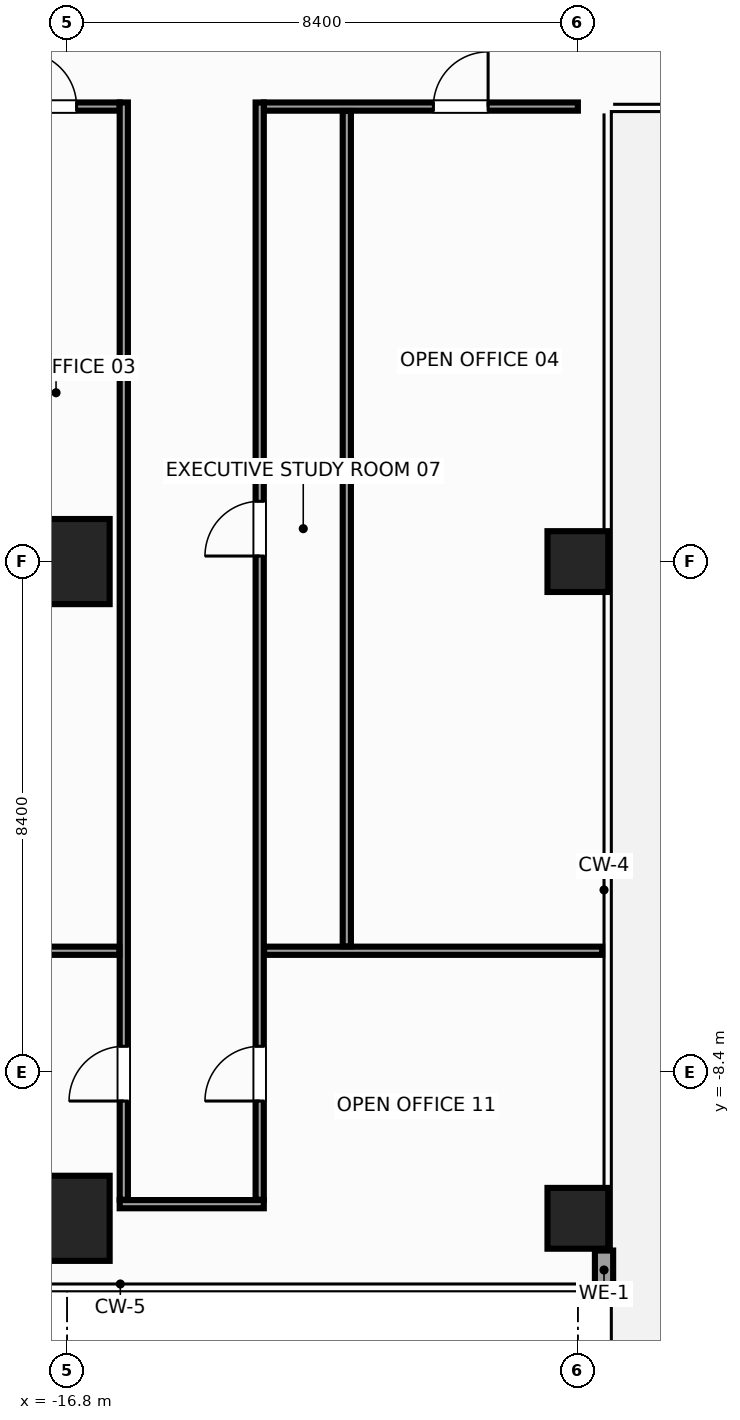
"""IFC4 building model, lengths in metres.
Left out: names, types, materials, properties, quantities, classifications, styles, units other than length and angle.
Written with IfcOpenShell. Run it as: python <this file> out.ifc"""

import sys

from ifc_helpers import new_model, si_unit, direction, frame, frame_2d, origin, origin_2d, place, context, subcontext, project, spatial, rectangle, hollow_rectangle, extrude, source, transform, mapped, element, fill, save


model = new_model("IFC4")
c1 = context("Model", 3, precision=1e-05, world=origin(), true_north=direction((0.0, 1.0)))
c2 = subcontext(c1, "Body", "Model", "MODEL_VIEW")
j1 = project(units=[si_unit("LENGTHUNIT", "METRE"), si_unit("PLANEANGLEUNIT", "RADIAN")], contexts=[c1])
p1 = place(None, origin())
s1 = spatial("IfcSite", under=j1, at=p1, CompositionType="ELEMENT")
p2 = place(p1, origin())
s2 = spatial("IfcBuilding", under=s1, at=p2, CompositionType="ELEMENT")
p3 = place(p2, frame((0.0, 0.0, 196.4)))
s3 = spatial("IfcBuildingStorey", under=s2, at=p3, CompositionType="ELEMENT", Elevation=196.4)
m1 = source(origin(), c2, "Body", "SweptSolid", [
    extrude(rectangle(XDim=1.4, YDim=1.4, at=origin_2d()), origin(), (0.0, 0.0, 1.0), 3.6),
])
for number, where, z_axis, x_axis in (
    (1, (-16.8, -10.8, 0.0), (0.0, 0.0, 1.0), (1.0, 0.0, 0.0)),
    (2, (-16.8, 0.0, 0.0), (0.0, 0.0, 1.0), (1.0, 0.0, 0.0)),
):
    element("IfcColumn", number, at=place(p3, frame(where, z_axis=z_axis, x_axis=x_axis)), inside=s3, PredefinedType="COLUMN", context=c2, shape_type="MappedRepresentation", body=[
        mapped(m1, transform((0.0, 0.0, 0.0), x_axis=(1.0, 0.0, 0.0), y_axis=(0.0, 1.0, 0.0), z_axis=(0.0, 0.0, 1.0), scale=1.0)),
    ])
m2 = source(origin(), c2, "Body", "SweptSolid", [
    extrude(hollow_rectangle(XDim=1.0, YDim=1.0, WallThickness=0.045, at=origin_2d()), origin(), (0.0, 0.0, 1.0), 3.6),
])
for number, where, z_axis, x_axis in (
    (3, (-8.4, 0.0, 0.0), (0.0, 0.0, 1.0), (1.0, 0.0, 0.0)),
    (4, (-8.4, -10.8, 0.0), (0.0, 0.0, 1.0), (1.0, 0.0, 0.0)),
):
    element("IfcColumn", number, at=place(p3, frame(where, z_axis=z_axis, x_axis=x_axis)), inside=s3, PredefinedType="COLUMN", context=c2, shape_type="MappedRepresentation", body=[
        mapped(m2, transform((0.0, 0.0, 0.0), x_axis=(1.0, 0.0, 0.0), y_axis=(0.0, 1.0, 0.0), z_axis=(0.0, 0.0, 1.0), scale=1.0)),
    ])
m3 = source(origin(), c2, "Body", "SweptSolid", [
    extrude(rectangle(XDim=0.64, YDim=0.24, at=frame_2d((0.32, 0.0))), origin(), (0.0, 0.0, 1.0), 2.76),
])
p4 = place(p3, frame((-7.97, -11.97, 0.0), z_axis=(0.0, 0.0, 1.0), x_axis=(0.0, 1.0, 0.0)))
e5 = element("IfcWall", 5, at=p4, inside=s3, PredefinedType="STANDARD", context=c2, shape_type="MappedRepresentation", body=[
    mapped(m3, transform((0.0, 0.0, 0.0), x_axis=(1.0, 0.0, 0.0), y_axis=(0.0, 1.0, 0.0), z_axis=(0.0, 0.0, 1.0), scale=1.0)),
])
m4 = source(origin(), c2, "Body", "SweptSolid", [
    extrude(rectangle(XDim=4.6, YDim=0.135, at=frame_2d((2.3, 0.0))), origin(), (0.0, 0.0, 1.0), 2.765),
])
p5 = place(p3, frame((-20.535, 7.482, 0.0), z_axis=(0.0, 0.0, 1.0), x_axis=(1.0, 0.0, 0.0)))
e6 = element("IfcWall", 6, at=p5, inside=s3, PredefinedType="PARTITIONING", context=c2, shape_type="MappedRepresentation", body=[
    mapped(m4, transform((0.0, 0.0, 0.0), x_axis=(1.0, 0.0, 0.0), y_axis=(0.0, 1.0, 0.0), z_axis=(0.0, 0.0, 1.0), scale=1.0)),
])
p6 = place(p5, frame((0.744, 0.0, 0.0)))
e7 = element("IfcOpeningElement", 7, at=p6, cuts=e6, PredefinedType="OPENING", context=c2, shape_type="SweptSolid", body=[
    extrude(rectangle(XDim=0.9, YDim=2.15, at=frame_2d((0.45, 1.075))), frame((0.0, 0.08, 0.0), z_axis=(0.0, -1.0, 0.0), x_axis=(1.0, 0.0, 0.0)), (0.0, 0.0, 1.0), 0.159),
])
p7 = place(p5, frame((2.991, 0.0, 0.0)))
e8 = element("IfcOpeningElement", 8, at=p7, cuts=e6, PredefinedType="OPENING", context=c2, shape_type="SweptSolid", body=[
    extrude(rectangle(XDim=0.9, YDim=2.15, at=frame_2d((0.45, 1.075))), frame((0.0, 0.08, 0.0), z_axis=(0.0, -1.0, 0.0), x_axis=(1.0, 0.0, 0.0)), (0.0, 0.0, 1.0), 0.159),
])
m5 = source(origin(), c2, "Body", "SweptSolid", [
    extrude(rectangle(XDim=5.165, YDim=0.135, at=frame_2d((2.583, 0.0))), origin(), (0.0, 0.0, 1.0), 3.38),
])
p8 = place(p3, frame((-13.565, 7.482, 0.0), z_axis=(0.0, 0.0, 1.0), x_axis=(1.0, 0.0, 0.0)))
e9 = element("IfcWall", 9, at=p8, inside=s3, PredefinedType="PARTITIONING", context=c2, shape_type="MappedRepresentation", body=[
    mapped(m5, transform((0.0, 0.0, 0.0), x_axis=(1.0, 0.0, 0.0), y_axis=(0.0, 1.0, 0.0), z_axis=(0.0, 0.0, 1.0), scale=1.0)),
])
p9 = place(p8, frame((2.789, 0.0, 0.0)))
e10 = element("IfcOpeningElement", 10, at=p9, cuts=e9, PredefinedType="OPENING", context=c2, shape_type="SweptSolid", body=[
    extrude(rectangle(XDim=0.9, YDim=2.15, at=frame_2d((0.45, 1.075))), frame((0.0, 0.08, 0.0), z_axis=(0.0, -1.0, 0.0), x_axis=(1.0, 0.0, 0.0)), (0.0, 0.0, 1.0), 0.159),
])
m6 = source(origin(), c2, "Body", "SweptSolid", [
    extrude(rectangle(XDim=2.37, YDim=0.135, at=frame_2d((1.185, 0.0))), origin(), (0.0, 0.0, 1.0), 3.38),
])
p10 = place(p3, frame((-15.935, -10.567, 0.0), z_axis=(0.0, 0.0, 1.0), x_axis=(1.0, 0.0, 0.0)))
e11 = element("IfcWall", 11, at=p10, inside=s3, PredefinedType="PARTITIONING", context=c2, shape_type="MappedRepresentation", body=[
    mapped(m6, transform((0.0, 0.0, 0.0), x_axis=(1.0, 0.0, 0.0), y_axis=(0.0, 1.0, 0.0), z_axis=(0.0, 0.0, 1.0), scale=1.0)),
])
m7 = source(origin(), c2, "Body", "SweptSolid", [
    extrude(rectangle(XDim=18.045, YDim=0.135, at=frame_2d((9.022, 0.0))), origin(), (0.0, 0.0, 1.0), 2.915),
])
p11 = place(p3, frame((-15.867, -10.495, 0.0), z_axis=(0.0, 0.0, 1.0), x_axis=(0.0, 1.0, 0.0)))
e12 = element("IfcWall", 12, at=p11, inside=s3, PredefinedType="PARTITIONING", context=c2, shape_type="MappedRepresentation", body=[
    mapped(m7, transform((0.0, 0.0, 0.0), x_axis=(1.0, 0.0, 0.0), y_axis=(0.0, 1.0, 0.0), z_axis=(0.0, 0.0, 1.0), scale=1.0)),
])
p12 = place(p11, frame((1.624, 0.0, 0.0)))
e13 = element("IfcOpeningElement", 13, at=p12, cuts=e12, PredefinedType="OPENING", context=c2, shape_type="SweptSolid", body=[
    extrude(rectangle(XDim=0.9, YDim=2.15, at=frame_2d((0.45, 1.075))), frame((0.0, 0.08, 0.0), z_axis=(0.0, -1.0, 0.0), x_axis=(1.0, 0.0, 0.0)), (0.0, 0.0, 1.0), 0.159),
])
p13 = place(p3, frame((-13.633, -10.495, 0.0), z_axis=(0.0, 0.0, 1.0), x_axis=(0.0, 1.0, 0.0)))
e14 = element("IfcWall", 14, at=p13, inside=s3, PredefinedType="PARTITIONING", context=c2, shape_type="MappedRepresentation", body=[
    mapped(m7, transform((0.0, 0.0, 0.0), x_axis=(1.0, 0.0, 0.0), y_axis=(0.0, 1.0, 0.0), z_axis=(0.0, 0.0, 1.0), scale=1.0)),
])
p14 = place(p13, frame((10.586, 0.0, 0.0)))
e15 = element("IfcOpeningElement", 15, at=p14, cuts=e14, PredefinedType="OPENING", context=c2, shape_type="SweptSolid", body=[
    extrude(rectangle(XDim=0.9, YDim=2.15, at=frame_2d((0.45, 1.075))), frame((0.0, 0.08, 0.0), z_axis=(0.0, -1.0, 0.0), x_axis=(1.0, 0.0, 0.0)), (0.0, 0.0, 1.0), 0.159),
])
p15 = place(p13, frame((1.624, 0.0, 0.0)))
e16 = element("IfcOpeningElement", 16, at=p15, cuts=e14, PredefinedType="OPENING", context=c2, shape_type="SweptSolid", body=[
    extrude(rectangle(XDim=0.9, YDim=2.15, at=frame_2d((0.45, 1.075))), frame((0.0, 0.08, 0.0), z_axis=(0.0, -1.0, 0.0), x_axis=(1.0, 0.0, 0.0)), (0.0, 0.0, 1.0), 0.159),
])
m8 = source(origin(), c2, "Body", "SweptSolid", [
    extrude(rectangle(XDim=7.91, YDim=0.135, at=frame_2d((3.955, 0.0))), origin(), (0.0, 0.0, 1.0), 2.765),
])
p16 = place(p3, frame((-23.85, -6.4, 0.0), z_axis=(0.0, 0.0, 1.0), x_axis=(1.0, 0.0, 0.0)))
e17 = element("IfcWall", 17, at=p16, inside=s3, PredefinedType="PARTITIONING", context=c2, shape_type="MappedRepresentation", body=[
    mapped(m8, transform((0.0, 0.0, 0.0), x_axis=(1.0, 0.0, 0.0), y_axis=(0.0, 1.0, 0.0), z_axis=(0.0, 0.0, 1.0), scale=1.0)),
])
m9 = source(origin(), c2, "Body", "SweptSolid", [
    extrude(rectangle(XDim=5.56, YDim=0.135, at=frame_2d((2.78, 0.0))), origin(), (0.0, 0.0, 1.0), 2.765),
])
p17 = place(p3, frame((-13.56, -6.4, 0.0), z_axis=(0.0, 0.0, 1.0), x_axis=(1.0, 0.0, 0.0)))
e18 = element("IfcWall", 18, at=p17, inside=s3, PredefinedType="PARTITIONING", context=c2, shape_type="MappedRepresentation", body=[
    mapped(m9, transform((0.0, 0.0, 0.0), x_axis=(1.0, 0.0, 0.0), y_axis=(0.0, 1.0, 0.0), z_axis=(0.0, 0.0, 1.0), scale=1.0)),
])
m10 = source(origin(), c2, "Body", "SweptSolid", [
    extrude(rectangle(XDim=13.737, YDim=0.135, at=frame_2d((6.869, 0.0))), origin(), (0.0, 0.0, 1.0), 2.915),
])
p18 = place(p3, frame((-12.2, -6.327, 0.0), z_axis=(0.0, 0.0, 1.0), x_axis=(0.0, 1.0, 0.0)))
e19 = element("IfcWall", 19, at=p18, inside=s3, PredefinedType="PARTITIONING", context=c2, shape_type="MappedRepresentation", body=[
    mapped(m10, transform((0.0, 0.0, 0.0), x_axis=(1.0, 0.0, 0.0), y_axis=(0.0, 1.0, 0.0), z_axis=(0.0, 0.0, 1.0), scale=1.0)),
])
m11 = source(origin(), c2, "Body", "SweptSolid", [
    extrude(rectangle(XDim=0.9, YDim=2.15, at=frame_2d((0.45, 1.075))), frame((0.0, 0.025, 0.0), z_axis=(0.0, -1.0, 0.0), x_axis=(1.0, 0.0, 0.0)), (0.0, 0.0, 1.0), 0.05),
])
p19 = place(p7, origin())
e20 = element("IfcDoor", 20, at=p19, inside=s3, OperationType="SINGLE_SWING_LEFT", PredefinedType="DOOR", context=c2, shape_type="MappedRepresentation", body=[
    mapped(m11, transform((0.0, 0.0, 0.0), x_axis=(1.0, 0.0, 0.0), y_axis=(0.0, 1.0, 0.0), z_axis=(0.0, 0.0, 1.0), scale=1.0)),
])
fill(e8, e20)
p20 = place(p9, origin())
e21 = element("IfcDoor", 21, at=p20, inside=s3, OperationType="SINGLE_SWING_RIGHT", PredefinedType="DOOR", context=c2, shape_type="MappedRepresentation", body=[
    mapped(m11, transform((0.0, 0.0, 0.0), x_axis=(1.0, 0.0, 0.0), y_axis=(0.0, 1.0, 0.0), z_axis=(0.0, 0.0, 1.0), scale=1.0)),
])
fill(e10, e21)
p21 = place(p14, origin())
e22 = element("IfcDoor", 22, at=p21, inside=s3, OperationType="SINGLE_SWING_LEFT", PredefinedType="DOOR", context=c2, shape_type="MappedRepresentation", body=[
    mapped(m11, transform((0.0, 0.0, 0.0), x_axis=(1.0, 0.0, 0.0), y_axis=(0.0, 1.0, 0.0), z_axis=(0.0, 0.0, 1.0), scale=1.0)),
])
fill(e15, e22)
p22 = place(p12, origin())
e23 = element("IfcDoor", 23, at=p22, inside=s3, OperationType="SINGLE_SWING_LEFT", PredefinedType="DOOR", context=c2, shape_type="MappedRepresentation", body=[
    mapped(m11, transform((0.0, 0.0, 0.0), x_axis=(1.0, 0.0, 0.0), y_axis=(0.0, 1.0, 0.0), z_axis=(0.0, 0.0, 1.0), scale=1.0)),
])
fill(e13, e23)
p23 = place(p15, origin())
e24 = element("IfcDoor", 24, at=p23, inside=s3, OperationType="SINGLE_SWING_LEFT", PredefinedType="DOOR", context=c2, shape_type="MappedRepresentation", body=[
    mapped(m11, transform((0.0, 0.0, 0.0), x_axis=(1.0, 0.0, 0.0), y_axis=(0.0, 1.0, 0.0), z_axis=(0.0, 0.0, 1.0), scale=1.0)),
])
fill(e16, e24)
save(model, sys.argv[1])
